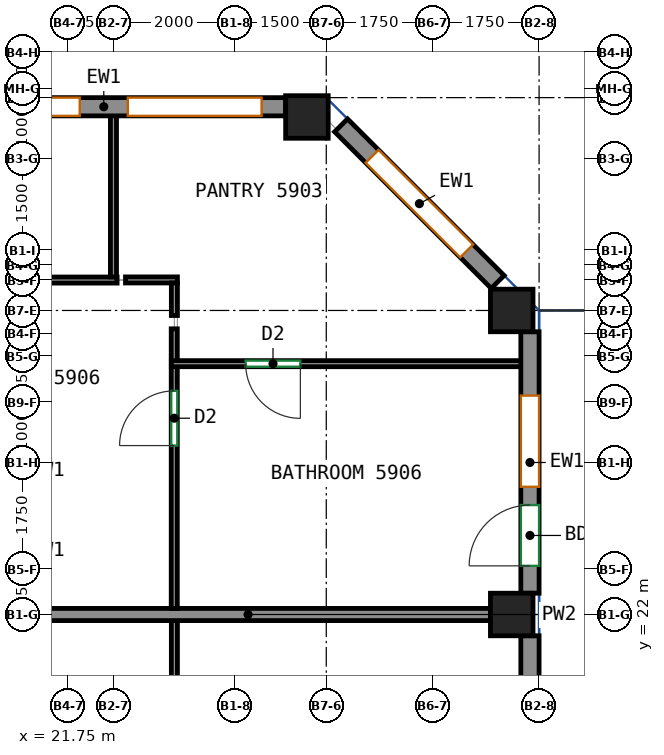
"""IFC4 building model, lengths in metres.
Left out: names, types, materials, properties, quantities, classifications, styles, units other than length and angle.
Written with IfcOpenShell. Run it as: python <this file> out.ifc"""

import sys

from ifc_helpers import new_model, si_unit, direction, frame, frame_2d, origin, origin_2d, place, context, subcontext, project, spatial, rectangle, extrude, source, transform, mapped, element, fill, save


model = new_model("IFC4")
c1 = context("Model", 3, precision=1e-05, world=origin(), true_north=direction((0.0, 1.0)))
c2 = subcontext(c1, "Body", "Model", "MODEL_VIEW")
j1 = project(units=[si_unit("LENGTHUNIT", "METRE"), si_unit("PLANEANGLEUNIT", "RADIAN")], contexts=[c1])
p1 = place(None, origin())
s1 = spatial("IfcSite", under=j1, at=p1, CompositionType="ELEMENT")
p2 = place(p1, origin())
s2 = spatial("IfcBuilding", under=s1, at=p2, CompositionType="ELEMENT")
p3 = place(p2, frame((0.0, 0.0, 245.8)))
s3 = spatial("IfcBuildingStorey", under=s2, at=p3, CompositionType="ELEMENT", Elevation=245.8)
m1 = source(origin(), c2, "Body", "SweptSolid", [
    extrude(rectangle(XDim=0.7, YDim=0.7, at=origin_2d()), origin(), (0.0, 0.0, 1.0), 3.12),
])
for number, where, z_axis, x_axis in (
    (1, (25.682, 30.182, 0.0), (0.0, 0.0, 1.0), (1.0, 0.0, 0.0)),
    (2, (29.05, 22.0, 0.0), (0.0, 0.0, 1.0), (1.0, 0.0, 0.0)),
    (3, (29.05, 27.0, 0.0), (0.0, 0.0, 1.0), (1.0, 0.0, 0.0)),
):
    element("IfcColumn", number, at=place(p3, frame(where, z_axis=z_axis, x_axis=x_axis)), inside=s3, PredefinedType="COLUMN", context=c2, shape_type="MappedRepresentation", body=[
        mapped(m1, transform((0.0, 0.0, 0.0))),
    ])
m2 = source(origin(), c2, "Body", "SweptSolid", [
    extrude(rectangle(XDim=13.3, YDim=0.3, at=frame_2d((6.65, 0.0))), origin(), (0.0, 0.0, 1.0), 3.12),
])
p4 = place(p3, frame((29.35, 8.35, 0.0), z_axis=(0.0, 0.0, 1.0), x_axis=(0.0, 1.0, 0.0)))
e4 = element("IfcWall", 4, at=p4, inside=s3, PredefinedType="SOLIDWALL", context=c2, shape_type="MappedRepresentation", body=[
    mapped(m2, transform((0.0, 0.0, 0.0))),
])
p5 = place(p4, frame((0.913, 0.0, 0.8)))
e5 = element("IfcOpeningElement", 5, at=p5, cuts=e4, PredefinedType="OPENING", context=c2, shape_type="SweptSolid", body=[
    extrude(rectangle(XDim=1.5, YDim=2.05, at=frame_2d((0.75, 1.025))), frame((0.0, 0.16, 0.0), z_axis=(0.0, -1.0, 0.0), x_axis=(1.0, 0.0, 0.0)), (0.0, 0.0, 1.0), 0.32),
])
p6 = place(p4, frame((4.238, 0.0, 0.8)))
e6 = element("IfcOpeningElement", 6, at=p6, cuts=e4, PredefinedType="OPENING", context=c2, shape_type="SweptSolid", body=[
    extrude(rectangle(XDim=1.5, YDim=2.05, at=frame_2d((0.75, 1.025))), frame((0.0, 0.16, 0.0), z_axis=(0.0, -1.0, 0.0), x_axis=(1.0, 0.0, 0.0)), (0.0, 0.0, 1.0), 0.32),
])
p7 = place(p4, frame((7.562, 0.0, 0.8)))
e7 = element("IfcOpeningElement", 7, at=p7, cuts=e4, PredefinedType="OPENING", context=c2, shape_type="SweptSolid", body=[
    extrude(rectangle(XDim=1.5, YDim=2.05, at=frame_2d((0.75, 1.025))), frame((0.0, 0.16, 0.0), z_axis=(0.0, -1.0, 0.0), x_axis=(1.0, 0.0, 0.0)), (0.0, 0.0, 1.0), 0.32),
])
p8 = place(p4, frame((10.887, 0.0, 0.8)))
e8 = element("IfcOpeningElement", 8, at=p8, cuts=e4, PredefinedType="OPENING", context=c2, shape_type="SweptSolid", body=[
    extrude(rectangle(XDim=1.5, YDim=2.05, at=frame_2d((0.75, 1.025))), frame((0.0, 0.16, 0.0), z_axis=(0.0, -1.0, 0.0), x_axis=(1.0, 0.0, 0.0)), (0.0, 0.0, 1.0), 0.32),
])
m3 = source(origin(), c2, "Body", "SweptSolid", [
    extrude(rectangle(XDim=4.3, YDim=0.3, at=frame_2d((2.15, 0.0))), origin(), (0.0, 0.0, 1.0), 3.12),
])
p9 = place(p3, frame((29.35, 22.35, 0.0), z_axis=(0.0, 0.0, 1.0), x_axis=(0.0, 1.0, 0.0)))
e9 = element("IfcWall", 9, at=p9, inside=s3, PredefinedType="SOLIDWALL", context=c2, shape_type="MappedRepresentation", body=[
    mapped(m3, transform((0.0, 0.0, 0.0))),
])
p10 = place(p9, frame((1.75, 0.0, 0.8)))
e10 = element("IfcOpeningElement", 10, at=p10, cuts=e9, PredefinedType="OPENING", context=c2, shape_type="SweptSolid", body=[
    extrude(rectangle(XDim=1.5, YDim=2.05, at=frame_2d((0.75, 1.025))), frame((0.0, 0.16, 0.0), z_axis=(0.0, -1.0, 0.0), x_axis=(1.0, 0.0, 0.0)), (0.0, 0.0, 1.0), 0.32),
])
p11 = place(p9, frame((0.45, 0.0, 0.0)))
e11 = element("IfcOpeningElement", 11, at=p11, cuts=e9, PredefinedType="OPENING", context=c2, shape_type="SweptSolid", body=[
    extrude(rectangle(XDim=1.0, YDim=2.1, at=frame_2d((0.5, 1.05))), frame((0.0, 0.16, 0.0), z_axis=(0.0, -1.0, 0.0), x_axis=(1.0, 0.0, 0.0)), (0.0, 0.0, 1.0), 0.32),
])
m4 = source(origin(), c2, "Body", "SweptSolid", [
    extrude(rectangle(XDim=3.642, YDim=0.3, at=frame_2d((1.821, 0.0))), origin(), (0.0, 0.0, 1.0), 3.12),
])
p12 = place(p3, frame((28.819, 27.469, 0.0), z_axis=(0.0, 0.0, 1.0), x_axis=(-0.707106781187, 0.707106781187, 0.0)))
e12 = element("IfcWall", 12, at=p12, inside=s3, PredefinedType="SOLIDWALL", context=c2, shape_type="MappedRepresentation", body=[
    mapped(m4, transform((0.0, 0.0, 0.0))),
])
p13 = place(p12, frame((0.721, 0.0, 0.8)))
e13 = element("IfcOpeningElement", 13, at=p13, cuts=e12, PredefinedType="OPENING", context=c2, shape_type="SweptSolid", body=[
    extrude(rectangle(XDim=2.2, YDim=2.05, at=frame_2d((1.1, 1.025))), frame((0.0, 0.16, 0.0), z_axis=(0.0, -1.0, 0.0), x_axis=(1.0, 0.0, 0.0)), (0.0, 0.0, 1.0), 0.32),
])
m5 = source(origin(), c2, "Body", "SweptSolid", [
    extrude(rectangle(XDim=5.982, YDim=0.3, at=frame_2d((2.991, 0.0))), origin(), (0.0, 0.0, 1.0), 3.12),
])
p14 = place(p3, frame((25.332, 30.35, 0.0), z_axis=(0.0, 0.0, 1.0), x_axis=(-1.0, 0.0, 0.0)))
e14 = element("IfcWall", 14, at=p14, inside=s3, PredefinedType="SOLIDWALL", context=c2, shape_type="MappedRepresentation", body=[
    mapped(m5, transform((0.0, 0.0, 0.0))),
])
p15 = place(p14, frame((0.396, 0.0, 0.8)))
e15 = element("IfcOpeningElement", 15, at=p15, cuts=e14, PredefinedType="OPENING", context=c2, shape_type="SweptSolid", body=[
    extrude(rectangle(XDim=2.2, YDim=2.05, at=frame_2d((1.1, 1.025))), frame((0.0, 0.16, 0.0), z_axis=(0.0, -1.0, 0.0), x_axis=(1.0, 0.0, 0.0)), (0.0, 0.0, 1.0), 0.32),
])
p16 = place(p14, frame((3.386, 0.0, 0.8)))
e16 = element("IfcOpeningElement", 16, at=p16, cuts=e14, PredefinedType="OPENING", context=c2, shape_type="SweptSolid", body=[
    extrude(rectangle(XDim=2.2, YDim=2.05, at=frame_2d((1.1, 1.025))), frame((0.0, 0.16, 0.0), z_axis=(0.0, -1.0, 0.0), x_axis=(1.0, 0.0, 0.0)), (0.0, 0.0, 1.0), 0.32),
])
p17 = place(p3, frame((23.502, 19.592, 0.0), z_axis=(0.0, 0.0, 1.0), x_axis=(0.0, 1.0, 0.0)))
e17 = element("IfcWall", 17, at=p17, inside=s3, PredefinedType="PARTITIONING", context=c2, shape_type="SweptSolid", body=[
    extrude(rectangle(XDim=2.308, YDim=0.1, at=frame_2d((1.154, 0.0))), origin(), (0.0, 0.0, 1.0), 3.12),
])
p18 = place(p3, frame((20.727, 22.0, 0.0), z_axis=(0.0, 0.0, 1.0), x_axis=(1.0, 0.0, 0.0)))
e18 = element("IfcWall", 18, at=p18, inside=s3, PredefinedType="PARTITIONING", context=c2, shape_type="SweptSolid", body=[
    extrude(rectangle(XDim=7.973, YDim=0.2, at=frame_2d((3.986, 0.0))), origin(), (0.0, 0.0, 1.0), 2.57),
])
p19 = place(p3, frame((11.9, 27.5, 0.0), z_axis=(0.0, 0.0, 1.0), x_axis=(1.0, 0.0, 0.0)))
e19 = element("IfcWall", 19, at=p19, inside=s3, PredefinedType="PARTITIONING", context=c2, shape_type="SweptSolid", body=[
    extrude(rectangle(XDim=10.66, YDim=0.1, at=frame_2d((5.33, 0.0))), origin(), (0.0, 0.0, 1.0), 3.12),
])
p20 = place(p19, frame((2.728, 0.0, 0.0)))
e20 = element("IfcOpeningElement", 20, at=p20, cuts=e19, PredefinedType="OPENING", context=c2, shape_type="SweptSolid", body=[
    extrude(rectangle(XDim=1.0, YDim=2.1, at=frame_2d((0.5, 1.05))), frame((0.0, 0.06, 0.0), z_axis=(0.0, -1.0, 0.0), x_axis=(1.0, 0.0, 0.0)), (0.0, 0.0, 1.0), 0.12),
])
p21 = place(p3, frame((23.5, 22.1, 0.0), z_axis=(0.0, 0.0, 1.0), x_axis=(0.0, 1.0, 0.0)))
e21 = element("IfcWall", 21, at=p21, inside=s3, PredefinedType="PARTITIONING", context=c2, shape_type="SweptSolid", body=[
    extrude(rectangle(XDim=3.985, YDim=0.1, at=frame_2d((1.992, 0.0))), origin(), (0.0, 0.0, 1.0), 3.12),
])
p22 = place(p21, frame((2.678, 0.0, 0.0)))
e22 = element("IfcOpeningElement", 22, at=p22, cuts=e21, PredefinedType="OPENING", context=c2, shape_type="SweptSolid", body=[
    extrude(rectangle(XDim=0.9, YDim=2.1, at=frame_2d((0.45, 1.05))), frame((0.0, 0.06, 0.0), z_axis=(0.0, -1.0, 0.0), x_axis=(1.0, 0.0, 0.0)), (0.0, 0.0, 1.0), 0.12),
])
p23 = place(p3, frame((23.552, 27.502, 0.0), z_axis=(0.0, 0.0, 1.0), x_axis=(-1.0, 0.0, 0.0)))
e23 = element("IfcWall", 23, at=p23, inside=s3, PredefinedType="PARTITIONING", context=c2, shape_type="SweptSolid", body=[
    extrude(rectangle(XDim=0.854, YDim=0.1, at=frame_2d((0.427, 0.0))), origin(), (0.0, 0.0, 1.0), 3.12),
])
p24 = place(p3, frame((23.502, 26.917, 0.0), z_axis=(0.0, 0.0, 1.0), x_axis=(0.0, 1.0, 0.0)))
e24 = element("IfcWall", 24, at=p24, inside=s3, PredefinedType="PARTITIONING", context=c2, shape_type="SweptSolid", body=[
    extrude(rectangle(XDim=0.535, YDim=0.1, at=frame_2d((0.268, 0.0))), origin(), (0.0, 0.0, 1.0), 3.12),
])
p25 = place(p3, frame((23.5, 26.165, 0.0), z_axis=(0.0, 0.0, 1.0), x_axis=(0.0, 1.0, 0.0)))
e25 = element("IfcWall", 25, at=p25, inside=s3, PredefinedType="PARTITIONING", context=c2, shape_type="SweptSolid", body=[
    extrude(rectangle(XDim=0.533, YDim=0.1, at=frame_2d((0.267, 0.0))), origin(), (0.0, 0.0, 1.0), 3.12),
])
p26 = place(p3, frame((22.5, 27.552, 0.0), z_axis=(0.0, 0.0, 1.0), x_axis=(0.0, 1.0, 0.0)))
e26 = element("IfcWall", 26, at=p26, inside=s3, PredefinedType="PARTITIONING", context=c2, shape_type="SweptSolid", body=[
    extrude(rectangle(XDim=2.698, YDim=0.1, at=frame_2d((1.349, 0.0))), origin(), (0.0, 0.0, 1.0), 3.12),
])
p27 = place(p3, frame((29.25, 26.125, 0.0), z_axis=(0.0, 0.0, 1.0), x_axis=(-1.0, 0.0, 0.0)))
e27 = element("IfcWall", 27, at=p27, inside=s3, PredefinedType="PARTITIONING", context=c2, shape_type="SweptSolid", body=[
    extrude(rectangle(XDim=5.798, YDim=0.1, at=frame_2d((2.899, 0.0))), origin(), (0.0, 0.0, 1.0), 3.12),
])
p28 = place(p27, frame((3.676, 0.0, 0.0)))
e28 = element("IfcOpeningElement", 28, at=p28, cuts=e27, PredefinedType="OPENING", context=c2, shape_type="SweptSolid", body=[
    extrude(rectangle(XDim=0.9, YDim=2.1, at=frame_2d((0.45, 1.05))), frame((0.0, 0.06, 0.0), z_axis=(0.0, -1.0, 0.0), x_axis=(1.0, 0.0, 0.0)), (0.0, 0.0, 1.0), 0.12),
])
p29 = place(p10, origin())
e29 = element("IfcWindow", 29, at=p29, inside=s3, PartitioningType="SINGLE_PANEL", PredefinedType="WINDOW", context=c2, shape_type="SweptSolid", body=[
    extrude(rectangle(XDim=1.5, YDim=2.05, at=frame_2d((0.75, 1.025))), frame((0.0, 0.03, 0.0), z_axis=(0.0, -1.0, 0.0), x_axis=(1.0, 0.0, 0.0)), (0.0, 0.0, 1.0), 0.06),
])
fill(e10, e29)
p30 = place(p11, origin())
e30 = element("IfcDoor", 30, at=p30, inside=s3, OperationType="SINGLE_SWING_LEFT", PredefinedType="DOOR", context=c2, shape_type="SweptSolid", body=[
    extrude(rectangle(XDim=1.0, YDim=2.1, at=frame_2d((0.5, 1.05))), frame((0.0, 0.025, 0.0), z_axis=(0.0, -1.0, 0.0), x_axis=(1.0, 0.0, 0.0)), (0.0, 0.0, 1.0), 0.05),
])
fill(e11, e30)
p31 = place(p13, origin())
e31 = element("IfcWindow", 31, at=p31, inside=s3, PartitioningType="SINGLE_PANEL", PredefinedType="WINDOW", context=c2, shape_type="SweptSolid", body=[
    extrude(rectangle(XDim=2.2, YDim=2.05, at=frame_2d((1.1, 1.025))), frame((0.0, 0.03, 0.0), z_axis=(0.0, -1.0, 0.0), x_axis=(1.0, 0.0, 0.0)), (0.0, 0.0, 1.0), 0.06),
])
fill(e13, e31)
p32 = place(p15, origin())
e32 = element("IfcWindow", 32, at=p32, inside=s3, PartitioningType="SINGLE_PANEL", PredefinedType="WINDOW", context=c2, shape_type="SweptSolid", body=[
    extrude(rectangle(XDim=2.2, YDim=2.05, at=frame_2d((1.1, 1.025))), frame((0.0, 0.03, 0.0), z_axis=(0.0, -1.0, 0.0), x_axis=(1.0, 0.0, 0.0)), (0.0, 0.0, 1.0), 0.06),
])
fill(e15, e32)
p33 = place(p16, origin())
e33 = element("IfcWindow", 33, at=p33, inside=s3, PartitioningType="SINGLE_PANEL", PredefinedType="WINDOW", context=c2, shape_type="SweptSolid", body=[
    extrude(rectangle(XDim=2.2, YDim=2.05, at=frame_2d((1.1, 1.025))), frame((0.0, 0.03, 0.0), z_axis=(0.0, -1.0, 0.0), x_axis=(1.0, 0.0, 0.0)), (0.0, 0.0, 1.0), 0.06),
])
fill(e16, e33)
p34 = place(p22, origin())
e34 = element("IfcDoor", 34, at=p34, inside=s3, OperationType="SINGLE_SWING_LEFT", PredefinedType="DOOR", context=c2, shape_type="SweptSolid", body=[
    extrude(rectangle(XDim=0.9, YDim=2.1, at=frame_2d((0.45, 1.05))), frame((0.0, 0.025, 0.0), z_axis=(0.0, -1.0, 0.0), x_axis=(1.0, 0.0, 0.0)), (0.0, 0.0, 1.0), 0.05),
])
fill(e22, e34)
p35 = place(p28, origin())
e35 = element("IfcDoor", 35, at=p35, inside=s3, OperationType="SINGLE_SWING_LEFT", PredefinedType="DOOR", context=c2, shape_type="SweptSolid", body=[
    extrude(rectangle(XDim=0.9, YDim=2.1, at=frame_2d((0.45, 1.05))), frame((0.0, 0.025, 0.0), z_axis=(0.0, -1.0, 0.0), x_axis=(1.0, 0.0, 0.0)), (0.0, 0.0, 1.0), 0.05),
])
fill(e28, e35)
save(model, sys.argv[1])
